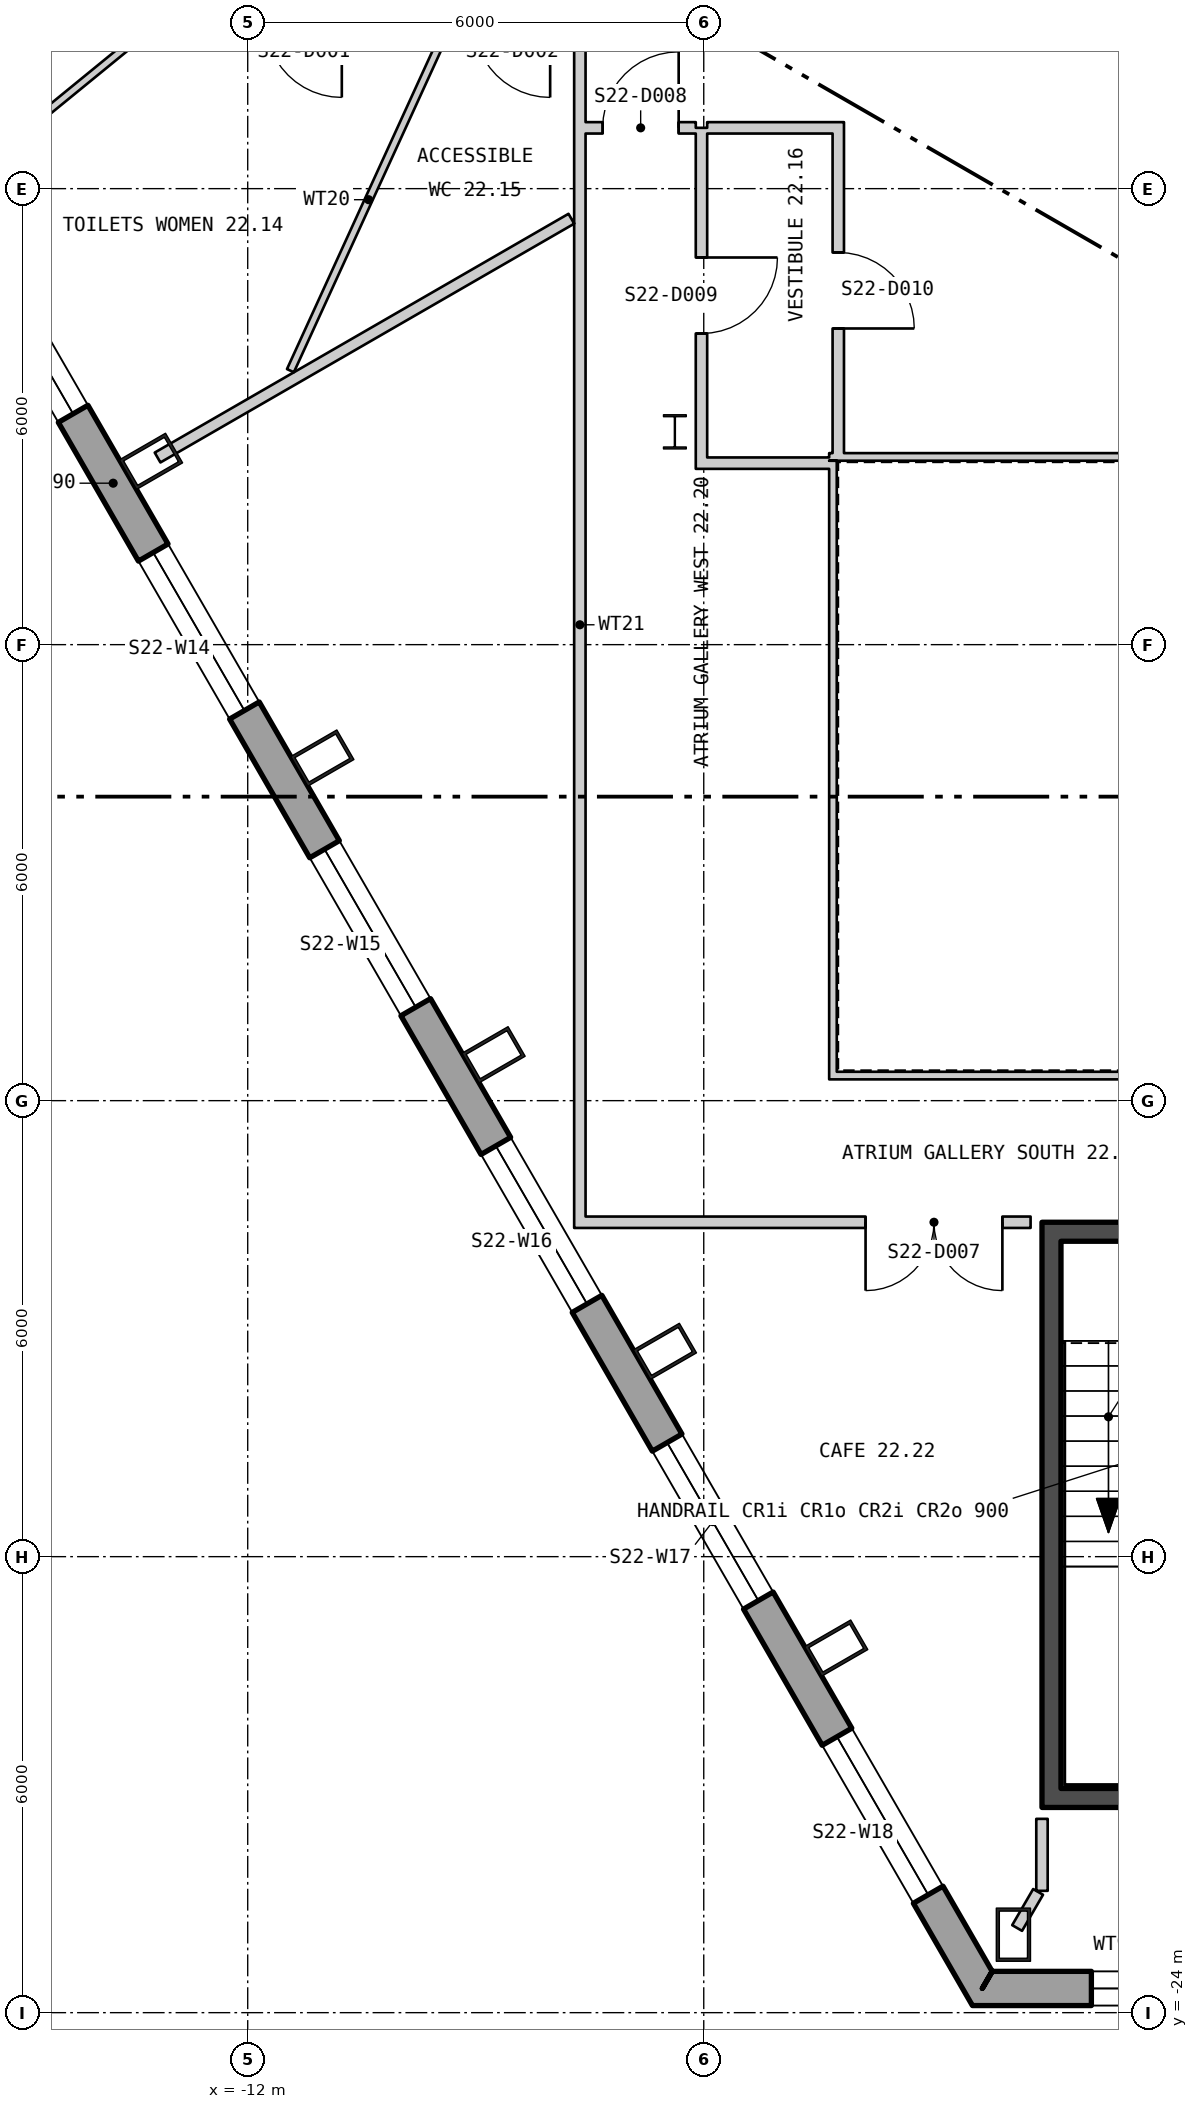
"""IFC4 building model, lengths in metres.
Left out: names, types, materials, properties, quantities, classifications, styles, units other than length and angle.
Written with IfcOpenShell. Run it as: python <this file> out.ifc"""

import sys

from ifc_helpers import new_model, si_unit, direction, frame, frame_2d, origin, origin_2d, place, context, subcontext, project, spatial, polyline, rectangle, hollow_rectangle, i_section, outline, extrude, element, fill, save


model = new_model("IFC4")
c1 = context("Model", 3, precision=1e-05, world=origin(), true_north=direction((0.0, 1.0)))
c2 = subcontext(c1, "Body", "Model", "MODEL_VIEW")
j1 = project(units=[si_unit("LENGTHUNIT", "METRE"), si_unit("PLANEANGLEUNIT", "RADIAN")], contexts=[c1])
p1 = place(None, origin())
s1 = spatial("IfcSite", under=j1, at=p1, CompositionType="ELEMENT")
p2 = place(p1, origin())
s2 = spatial("IfcBuilding", under=s1, at=p2, CompositionType="ELEMENT")
p3 = place(p2, frame((0.0, 0.0, 298.2)))
s3 = spatial("IfcBuildingStorey", under=s2, at=p3, CompositionType="ELEMENT", Elevation=298.2)
for number, where, z_axis, x_axis in (
    (1, (-13.272, -3.588, 0.0), (0.0, 0.0, 1.0), (0.5, -0.866, 0.0)),
    (2, (-11.018, -7.492, 0.0), (0.0, 0.0, 1.0), (0.5, -0.866, 0.0)),
    (3, (-8.765, -11.396, 0.0), (0.0, 0.0, 1.0), (0.5, -0.866, 0.0)),
    (4, (-6.511, -15.299, 0.0), (0.0, 0.0, 1.0), (0.5, -0.866, 0.0)),
    (5, (-4.257, -19.203, 0.0), (0.0, 0.0, 1.0), (0.5, -0.866, 0.0)),
    (6, (-1.926, -22.974, 0.0), (0.0, 0.0, 1.0), (1.0, 0.0, 0.0)),
):
    element("IfcColumn", number, at=place(p3, frame(where, z_axis=z_axis, x_axis=x_axis)), inside=s3, PredefinedType="COLUMN", context=c2, shape_type="SweptSolid", body=[
        extrude(hollow_rectangle(XDim=0.45, YDim=0.7, WallThickness=0.04, at=origin_2d()), origin(), (0.0, 0.0, 1.0), 6.0),
    ])
p4 = place(p3, frame((-6.38, -3.2, 0.0), z_axis=(0.0, 0.0, 1.0), x_axis=(1.0, 0.0, 0.0)))
e7 = element("IfcColumn", 7, at=p4, inside=s3, PredefinedType="COLUMN", context=c2, shape_type="SweptSolid", body=[
    extrude(i_section(OverallWidth=0.3, OverallDepth=0.45, WebThickness=0.014, FlangeThickness=0.026, at=origin_2d()), origin(), (0.0, 0.0, 1.0), 6.0),
])
p5 = place(p3, frame((-25.205, 15.931, -0.28), z_axis=(0.0, 0.0, 1.0), x_axis=(0.499999764979, -0.866025539474, 0.0)))
e8 = element("IfcWall", 8, at=p5, inside=s3, PredefinedType="SOLIDWALL", context=c2, shape_type="SweptSolid", body=[
    extrude(outline(polyline([(-0.13, -0.225), (45.87, -0.225), (45.61, 0.225), (0.13, 0.225), (-0.13, -0.225)])), origin(), (0.0, 0.0, 1.0), 6.1),
])
p6 = place(p5, frame((1.424, 0.0, 1.18)))
e9 = element("IfcOpeningElement", 9, at=p6, cuts=e8, PredefinedType="OPENING", context=c2, shape_type="SweptSolid", body=[
    extrude(rectangle(XDim=2.4, YDim=4.1, at=frame_2d((1.2, 2.05))), frame((0.0, 0.235, 0.0), z_axis=(0.0, -1.0, 0.0), x_axis=(1.0, 0.0, 0.0)), (0.0, 0.0, 1.0), 0.47),
])
p7 = place(p5, frame((5.893, 0.0, 1.18)))
e10 = element("IfcOpeningElement", 10, at=p7, cuts=e8, PredefinedType="OPENING", context=c2, shape_type="SweptSolid", body=[
    extrude(rectangle(XDim=2.4, YDim=4.1, at=frame_2d((1.2, 2.05))), frame((0.0, 0.235, 0.0), z_axis=(0.0, -1.0, 0.0), x_axis=(1.0, 0.0, 0.0)), (0.0, 0.0, 1.0), 0.47),
])
p8 = place(p5, frame((10.401, 0.0, 1.18)))
e11 = element("IfcOpeningElement", 11, at=p8, cuts=e8, PredefinedType="OPENING", context=c2, shape_type="SweptSolid", body=[
    extrude(rectangle(XDim=2.4, YDim=4.1, at=frame_2d((1.2, 2.05))), frame((0.0, 0.235, 0.0), z_axis=(0.0, -1.0, 0.0), x_axis=(1.0, 0.0, 0.0)), (0.0, 0.0, 1.0), 0.47),
])
p9 = place(p5, frame((14.909, 0.0, 1.18)))
e12 = element("IfcOpeningElement", 12, at=p9, cuts=e8, PredefinedType="OPENING", context=c2, shape_type="SweptSolid", body=[
    extrude(rectangle(XDim=2.4, YDim=4.1, at=frame_2d((1.2, 2.05))), frame((0.0, 0.235, 0.0), z_axis=(0.0, -1.0, 0.0), x_axis=(1.0, 0.0, 0.0)), (0.0, 0.0, 1.0), 0.47),
])
p10 = place(p5, frame((19.416, 0.0, 1.18)))
e13 = element("IfcOpeningElement", 13, at=p10, cuts=e8, PredefinedType="OPENING", context=c2, shape_type="SweptSolid", body=[
    extrude(rectangle(XDim=2.4, YDim=4.1, at=frame_2d((1.2, 2.05))), frame((0.0, 0.235, 0.0), z_axis=(0.0, -1.0, 0.0), x_axis=(1.0, 0.0, 0.0)), (0.0, 0.0, 1.0), 0.47),
])
p11 = place(p5, frame((23.924, 0.0, 1.18)))
e14 = element("IfcOpeningElement", 14, at=p11, cuts=e8, PredefinedType="OPENING", context=c2, shape_type="SweptSolid", body=[
    extrude(rectangle(XDim=2.4, YDim=4.1, at=frame_2d((1.2, 2.05))), frame((0.0, 0.235, 0.0), z_axis=(0.0, -1.0, 0.0), x_axis=(1.0, 0.0, 0.0)), (0.0, 0.0, 1.0), 0.47),
])
p12 = place(p5, frame((28.431, 0.0, 1.18)))
e15 = element("IfcOpeningElement", 15, at=p12, cuts=e8, PredefinedType="OPENING", context=c2, shape_type="SweptSolid", body=[
    extrude(rectangle(XDim=2.4, YDim=4.1, at=frame_2d((1.2, 2.05))), frame((0.0, 0.235, 0.0), z_axis=(0.0, -1.0, 0.0), x_axis=(1.0, 0.0, 0.0)), (0.0, 0.0, 1.0), 0.47),
])
p13 = place(p5, frame((32.939, 0.0, 1.18)))
e16 = element("IfcOpeningElement", 16, at=p13, cuts=e8, PredefinedType="OPENING", context=c2, shape_type="SweptSolid", body=[
    extrude(rectangle(XDim=2.4, YDim=4.1, at=frame_2d((1.2, 2.05))), frame((0.0, 0.235, 0.0), z_axis=(0.0, -1.0, 0.0), x_axis=(1.0, 0.0, 0.0)), (0.0, 0.0, 1.0), 0.47),
])
p14 = place(p5, frame((37.447, 0.0, 1.18)))
e17 = element("IfcOpeningElement", 17, at=p14, cuts=e8, PredefinedType="OPENING", context=c2, shape_type="SweptSolid", body=[
    extrude(rectangle(XDim=2.4, YDim=4.1, at=frame_2d((1.2, 2.05))), frame((0.0, 0.235, 0.0), z_axis=(0.0, -1.0, 0.0), x_axis=(1.0, 0.0, 0.0)), (0.0, 0.0, 1.0), 0.47),
])
p15 = place(p5, frame((41.916, 0.0, 1.18)))
e18 = element("IfcOpeningElement", 18, at=p15, cuts=e8, PredefinedType="OPENING", context=c2, shape_type="SweptSolid", body=[
    extrude(rectangle(XDim=2.4, YDim=4.1, at=frame_2d((1.2, 2.05))), frame((0.0, 0.235, 0.0), z_axis=(0.0, -1.0, 0.0), x_axis=(1.0, 0.0, 0.0)), (0.0, 0.0, 1.0), 0.47),
])
p16 = place(p3, frame((-2.335, -23.682, -0.28), z_axis=(0.0, 0.0, 1.0), x_axis=(1.0, 0.0, 0.0)))
e19 = element("IfcWall", 19, at=p16, inside=s3, PredefinedType="SOLIDWALL", context=c2, shape_type="SweptSolid", body=[
    extrude(outline(polyline([(-0.13, -0.225), (4.8, -0.225), (4.54, 0.225), (0.13, 0.225), (-0.13, -0.225)])), origin(), (0.0, 0.0, 1.0), 6.1),
])
p17 = place(p16, frame((1.435, 0.0, 1.18)))
e20 = element("IfcOpeningElement", 20, at=p17, cuts=e19, PredefinedType="OPENING", context=c2, shape_type="SweptSolid", body=[
    extrude(rectangle(XDim=1.8, YDim=4.1, at=frame_2d((0.9, 2.05))), frame((0.0, 0.235, 0.0), z_axis=(0.0, -1.0, 0.0), x_axis=(1.0, 0.0, 0.0)), (0.0, 0.0, 1.0), 0.47),
])
for number, where, z_axis, x_axis in (
    (21, (-4.35, -11.67, 0.0), (0.0, 0.0, 1.0), (1.0, 0.0, 0.0)),
    (22, (4.35, -3.53, 0.0), (0.0, 0.0, 1.0), (-1.0, 0.0, 0.0)),
):
    element("IfcWall", number, at=place(p3, frame(where, z_axis=z_axis, x_axis=x_axis)), inside=s3, PredefinedType="PARTITIONING", context=c2, shape_type="SweptSolid", body=[
        extrude(rectangle(XDim=8.7, YDim=0.1, at=frame_2d((4.35, 0.0))), origin(), (0.0, 0.0, 1.0), 5.8),
    ])
p18 = place(p3, frame((-4.3, -3.58, 0.0), z_axis=(0.0, 0.0, 1.0), x_axis=(0.0, -1.0, 0.0)))
e23 = element("IfcWall", 23, at=p18, inside=s3, PredefinedType="PARTITIONING", context=c2, shape_type="SweptSolid", body=[
    extrude(rectangle(XDim=8.04, YDim=0.1, at=frame_2d((4.02, 0.0))), origin(), (0.0, 0.0, 1.0), 5.8),
])
p19 = place(p3, frame((-1.425, -21.05, 0.0), z_axis=(0.0, 0.0, 1.0), x_axis=(0.0, 1.0, 0.0)))
e24 = element("IfcWall", 24, at=p19, inside=s3, PredefinedType="SHEAR", context=c2, shape_type="SweptSolid", body=[
    extrude(rectangle(XDim=7.2, YDim=0.25, at=frame_2d((3.6, 0.0))), origin(), (0.0, 0.0, 1.0), 5.8),
])
for number, where, z_axis, x_axis in (
    (25, (-1.55, -21.175, 0.0), (0.0, 0.0, 1.0), (1.0, 0.0, 0.0)),
    (26, (-1.55, -13.725, 0.0), (0.0, 0.0, 1.0), (1.0, 0.0, 0.0)),
):
    element("IfcWall", number, at=place(p3, frame(where, z_axis=z_axis, x_axis=x_axis)), inside=s3, PredefinedType="SHEAR", context=c2, shape_type="SweptSolid", body=[
        extrude(rectangle(XDim=3.1, YDim=0.25, at=frame_2d((1.55, 0.0))), origin(), (0.0, 0.0, 1.0), 5.8),
    ])
p20 = place(p3, frame((-15.436, 0.363, 0.0), z_axis=(0.0, 0.0, 1.0), x_axis=(0.774415182093, 0.632677742412, 0.0)))
e27 = element("IfcWall", 27, at=p20, inside=s3, PredefinedType="PARTITIONING", context=c2, shape_type="SweptSolid", body=[
    extrude(rectangle(XDim=2.723, YDim=0.1, at=frame_2d((1.362, 0.0))), origin(), (0.0, 0.0, 1.0), 5.8),
])
p21 = place(p3, frame((-13.186, -3.538, 0.0), z_axis=(0.0, 0.0, 1.0), x_axis=(0.866100818307, 0.499869355459, 0.0)))
e28 = element("IfcWall", 28, at=p21, inside=s3, PredefinedType="PARTITIONING", context=c2, shape_type="SweptSolid", body=[
    extrude(rectangle(XDim=6.286, YDim=0.15, at=frame_2d((3.143, 0.0))), origin(), (0.0, 0.0, 1.0), 5.8),
])
p22 = place(p3, frame((-11.438, -2.395, 0.0), z_axis=(0.0, 0.0, 1.0), x_axis=(0.415979482181, 0.909373999191, 0.0)))
e29 = element("IfcWall", 29, at=p22, inside=s3, PredefinedType="PARTITIONING", context=c2, shape_type="SweptSolid", body=[
    extrude(rectangle(XDim=4.947, YDim=0.1, at=frame_2d((2.474, 0.0))), origin(), (0.0, 0.0, 1.0), 5.8),
])
p23 = place(p3, frame((-7.63, -13.675, 0.0), z_axis=(0.0, 0.0, 1.0), x_axis=(0.0, 1.0, 0.0)))
e30 = element("IfcWall", 30, at=p23, inside=s3, PredefinedType="PARTITIONING", context=c2, shape_type="SweptSolid", body=[
    extrude(rectangle(XDim=15.873, YDim=0.15, at=frame_2d((7.936, 0.0))), origin(), (0.0, 0.0, 1.0), 5.8),
])
p24 = place(p3, frame((-7.555, -13.6, 0.0), z_axis=(0.0, 0.0, 1.0), x_axis=(1.0, 0.0, 0.0)))
e31 = element("IfcWall", 31, at=p24, inside=s3, PredefinedType="PARTITIONING", context=c2, shape_type="SweptSolid", body=[
    extrude(rectangle(XDim=0.48, YDim=0.15, at=frame_2d((0.24, 0.0))), origin(), (0.0, 0.0, 1.0), 5.8),
])
p25 = place(p3, frame((-7.075, -13.6, 0.0), z_axis=(0.0, 0.0, 1.0), x_axis=(1.0, 0.0, 0.0)))
e32 = element("IfcWall", 32, at=p25, inside=s3, PredefinedType="PARTITIONING", context=c2, shape_type="SweptSolid", body=[
    extrude(rectangle(XDim=5.375, YDim=0.15, at=frame_2d((2.688, 0.0))), origin(), (0.0, 0.0, 1.0), 4.986),
])
p26 = place(p25, frame((3.204, 0.0, 0.0)))
e33 = element("IfcOpeningElement", 33, at=p26, cuts=e32, PredefinedType="OPENING", context=c2, shape_type="SweptSolid", body=[
    extrude(rectangle(XDim=1.8, YDim=2.1, at=frame_2d((0.9, 1.05))), frame((0.0, 0.085, 0.0), z_axis=(0.0, -1.0, 0.0), x_axis=(1.0, 0.0, 0.0)), (0.0, 0.0, 1.0), 0.17),
])
p27 = place(p3, frame((-7.555, 0.8, 0.0), z_axis=(0.0, 0.0, 1.0), x_axis=(1.0, 0.0, 0.0)))
e34 = element("IfcWall", 34, at=p27, inside=s3, PredefinedType="PARTITIONING", context=c2, shape_type="SweptSolid", body=[
    extrude(rectangle(XDim=1.45, YDim=0.15, at=frame_2d((0.725, 0.0))), origin(), (0.0, 0.0, 1.0), 5.8),
])
p28 = place(p27, frame((0.225, 0.0, 0.0)))
e35 = element("IfcOpeningElement", 35, at=p28, cuts=e34, PredefinedType="OPENING", context=c2, shape_type="SweptSolid", body=[
    extrude(rectangle(XDim=1.0, YDim=2.1, at=frame_2d((0.5, 1.05))), frame((0.0, 0.085, 0.0), z_axis=(0.0, -1.0, 0.0), x_axis=(1.0, 0.0, 0.0)), (0.0, 0.0, 1.0), 0.17),
])
p29 = place(p3, frame((-6.03, -3.687, 0.0), z_axis=(0.0, 0.0, 1.0), x_axis=(0.0, 1.0, 0.0)))
e36 = element("IfcWall", 36, at=p29, inside=s3, PredefinedType="PARTITIONING", context=c2, shape_type="SweptSolid", body=[
    extrude(rectangle(XDim=4.487, YDim=0.15, at=frame_2d((2.244, 0.0))), origin(), (0.0, 0.0, 1.0), 5.8),
])
p30 = place(p29, frame((1.781, 0.0, 0.0)))
e37 = element("IfcOpeningElement", 37, at=p30, cuts=e36, PredefinedType="OPENING", context=c2, shape_type="SweptSolid", body=[
    extrude(rectangle(XDim=1.0, YDim=2.1, at=frame_2d((0.5, 1.05))), frame((0.0, 0.085, 0.0), z_axis=(0.0, -1.0, 0.0), x_axis=(1.0, 0.0, 0.0)), (0.0, 0.0, 1.0), 0.17),
])
p31 = place(p3, frame((-5.955, -3.612, 0.0), z_axis=(0.0, 0.0, 1.0), x_axis=(1.0, 0.0, 0.0)))
e38 = element("IfcWall", 38, at=p31, inside=s3, PredefinedType="PARTITIONING", context=c2, shape_type="SweptSolid", body=[
    extrude(rectangle(XDim=1.605, YDim=0.15, at=frame_2d((0.802, 0.0))), origin(), (0.0, 0.0, 1.0), 5.8),
])
p32 = place(p3, frame((-5.955, 0.8, 0.0), z_axis=(0.0, 0.0, 1.0), x_axis=(1.0, 0.0, 0.0)))
e39 = element("IfcWall", 39, at=p32, inside=s3, PredefinedType="PARTITIONING", context=c2, shape_type="SweptSolid", body=[
    extrude(rectangle(XDim=1.65, YDim=0.15, at=frame_2d((0.825, 0.0))), origin(), (0.0, 0.0, 1.0), 5.8),
])
p33 = place(p3, frame((-4.23, -3.48, 0.0), z_axis=(0.0, 0.0, 1.0), x_axis=(0.0, 1.0, 0.0)))
e40 = element("IfcWall", 40, at=p33, inside=s3, PredefinedType="PARTITIONING", context=c2, shape_type="SweptSolid", body=[
    extrude(rectangle(XDim=4.355, YDim=0.15, at=frame_2d((2.178, 0.0))), origin(), (0.0, 0.0, 1.0), 5.8),
])
p34 = place(p33, frame((1.64, 0.0, 0.0)))
e41 = element("IfcOpeningElement", 41, at=p34, cuts=e40, PredefinedType="OPENING", context=c2, shape_type="SweptSolid", body=[
    extrude(rectangle(XDim=1.0, YDim=2.1, at=frame_2d((0.5, 1.05))), frame((0.0, 0.085, 0.0), z_axis=(0.0, -1.0, 0.0), x_axis=(1.0, 0.0, 0.0)), (0.0, 0.0, 1.0), 0.17),
])
p35 = place(p3, frame((-1.877, -22.886, 0.0), z_axis=(0.0, 0.0, 1.0), x_axis=(0.502398975187, 0.864635917442, 0.0)))
e42 = element("IfcWall", 42, at=p35, inside=s3, PredefinedType="PARTITIONING", context=c2, shape_type="SweptSolid", body=[
    extrude(rectangle(XDim=0.549, YDim=0.15, at=frame_2d((0.275, 0.0))), origin(), (0.0, 0.0, 1.0), 5.8),
])
p36 = place(p3, frame((-1.55, -22.397, 0.0), z_axis=(0.0, 0.0, 1.0), x_axis=(0.0, 1.0, 0.0)))
e43 = element("IfcWall", 43, at=p36, inside=s3, PredefinedType="PARTITIONING", context=c2, shape_type="SweptSolid", body=[
    extrude(rectangle(XDim=0.947, YDim=0.15, at=frame_2d((0.473, 0.0))), origin(), (0.0, 0.0, 1.0), 5.8),
])
p37 = place(p10, origin())
e44 = element("IfcWindow", 44, at=p37, inside=s3, PartitioningType="SINGLE_PANEL", PredefinedType="WINDOW", context=c2, shape_type="SweptSolid", body=[
    extrude(rectangle(XDim=2.4, YDim=4.1, at=frame_2d((1.2, 2.05))), frame((0.0, 0.105, 0.0), z_axis=(0.0, -1.0, 0.0), x_axis=(1.0, 0.0, 0.0)), (0.0, 0.0, 1.0), 0.06),
])
fill(e13, e44)
p38 = place(p11, origin())
e45 = element("IfcWindow", 45, at=p38, inside=s3, PartitioningType="SINGLE_PANEL", PredefinedType="WINDOW", context=c2, shape_type="SweptSolid", body=[
    extrude(rectangle(XDim=2.4, YDim=4.1, at=frame_2d((1.2, 2.05))), frame((0.0, 0.105, 0.0), z_axis=(0.0, -1.0, 0.0), x_axis=(1.0, 0.0, 0.0)), (0.0, 0.0, 1.0), 0.06),
])
fill(e14, e45)
p39 = place(p12, origin())
e46 = element("IfcWindow", 46, at=p39, inside=s3, PartitioningType="SINGLE_PANEL", PredefinedType="WINDOW", context=c2, shape_type="SweptSolid", body=[
    extrude(rectangle(XDim=2.4, YDim=4.1, at=frame_2d((1.2, 2.05))), frame((0.0, 0.105, 0.0), z_axis=(0.0, -1.0, 0.0), x_axis=(1.0, 0.0, 0.0)), (0.0, 0.0, 1.0), 0.06),
])
fill(e15, e46)
p40 = place(p13, origin())
e47 = element("IfcWindow", 47, at=p40, inside=s3, PartitioningType="SINGLE_PANEL", PredefinedType="WINDOW", context=c2, shape_type="SweptSolid", body=[
    extrude(rectangle(XDim=2.4, YDim=4.1, at=frame_2d((1.2, 2.05))), frame((0.0, 0.105, 0.0), z_axis=(0.0, -1.0, 0.0), x_axis=(1.0, 0.0, 0.0)), (0.0, 0.0, 1.0), 0.06),
])
fill(e16, e47)
p41 = place(p14, origin())
e48 = element("IfcWindow", 48, at=p41, inside=s3, PartitioningType="SINGLE_PANEL", PredefinedType="WINDOW", context=c2, shape_type="SweptSolid", body=[
    extrude(rectangle(XDim=2.4, YDim=4.1, at=frame_2d((1.2, 2.05))), frame((0.0, 0.105, 0.0), z_axis=(0.0, -1.0, 0.0), x_axis=(1.0, 0.0, 0.0)), (0.0, 0.0, 1.0), 0.06),
])
fill(e17, e48)
p42 = place(p15, origin())
e49 = element("IfcWindow", 49, at=p42, inside=s3, PartitioningType="SINGLE_PANEL", PredefinedType="WINDOW", context=c2, shape_type="SweptSolid", body=[
    extrude(rectangle(XDim=2.4, YDim=4.1, at=frame_2d((1.2, 2.05))), frame((0.0, 0.105, 0.0), z_axis=(0.0, -1.0, 0.0), x_axis=(1.0, 0.0, 0.0)), (0.0, 0.0, 1.0), 0.06),
])
fill(e18, e49)
p43 = place(p17, origin())
e50 = element("IfcWindow", 50, at=p43, inside=s3, PartitioningType="SINGLE_PANEL", PredefinedType="WINDOW", context=c2, shape_type="SweptSolid", body=[
    extrude(rectangle(XDim=1.8, YDim=4.1, at=frame_2d((0.9, 2.05))), frame((0.0, 0.105, 0.0), z_axis=(0.0, -1.0, 0.0), x_axis=(1.0, 0.0, 0.0)), (0.0, 0.0, 1.0), 0.06),
])
fill(e20, e50)
p44 = place(p26, origin())
e51 = element("IfcDoor", 51, at=p44, inside=s3, OperationType="DOUBLE_DOOR_SINGLE_SWING", PredefinedType="DOOR", context=c2, shape_type="SweptSolid", body=[
    extrude(rectangle(XDim=1.8, YDim=2.1, at=frame_2d((0.9, 1.05))), frame((0.0, 0.025, 0.0), z_axis=(0.0, -1.0, 0.0), x_axis=(1.0, 0.0, 0.0)), (0.0, 0.0, 1.0), 0.05),
])
fill(e33, e51)
p45 = place(p28, origin())
e52 = element("IfcDoor", 52, at=p45, inside=s3, OperationType="SINGLE_SWING_LEFT", PredefinedType="DOOR", context=c2, shape_type="SweptSolid", body=[
    extrude(rectangle(XDim=1.0, YDim=2.1, at=frame_2d((0.5, 1.05))), frame((0.0, 0.025, 0.0), z_axis=(0.0, -1.0, 0.0), x_axis=(1.0, 0.0, 0.0)), (0.0, 0.0, 1.0), 0.05),
])
fill(e35, e52)
p46 = place(p30, origin())
e53 = element("IfcDoor", 53, at=p46, inside=s3, OperationType="SINGLE_SWING_RIGHT", PredefinedType="DOOR", context=c2, shape_type="SweptSolid", body=[
    extrude(rectangle(XDim=1.0, YDim=2.1, at=frame_2d((0.5, 1.05))), frame((0.0, 0.025, 0.0), z_axis=(0.0, -1.0, 0.0), x_axis=(1.0, 0.0, 0.0)), (0.0, 0.0, 1.0), 0.05),
])
fill(e37, e53)
p47 = place(p34, origin())
e54 = element("IfcDoor", 54, at=p47, inside=s3, OperationType="SINGLE_SWING_LEFT", PredefinedType="DOOR", context=c2, shape_type="SweptSolid", body=[
    extrude(rectangle(XDim=1.0, YDim=2.1, at=frame_2d((0.5, 1.05))), frame((0.0, 0.025, 0.0), z_axis=(0.0, -1.0, 0.0), x_axis=(1.0, 0.0, 0.0)), (0.0, 0.0, 1.0), 0.05),
])
fill(e41, e54)
save(model, sys.argv[1])
